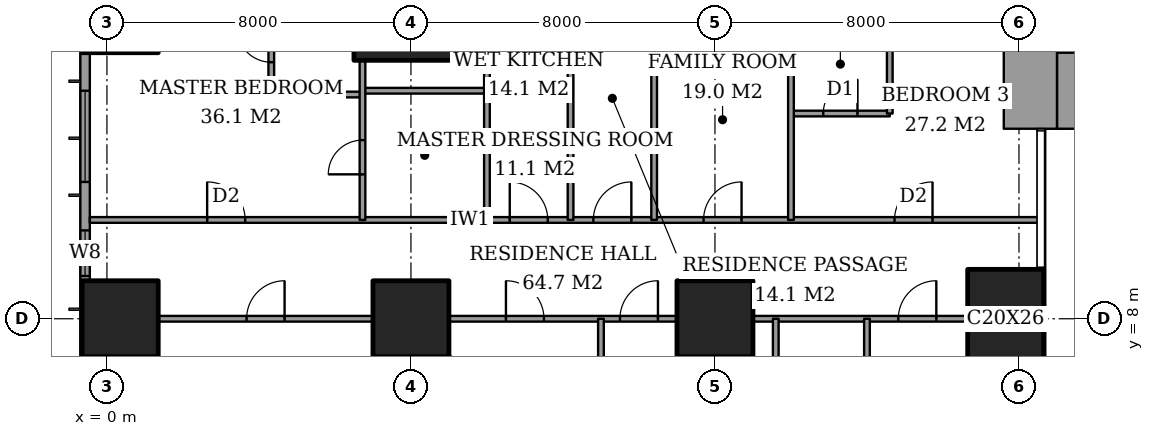
"""IFC4 building model, lengths in metres.
Left out: names, types, materials, properties, quantities, classifications, styles, units other than length and angle.
Written with IfcOpenShell. Run it as: python <this file> out.ifc"""

import sys

from ifc_helpers import new_model, si_unit, direction, frame, frame_2d, origin, origin_2d, place, context, subcontext, project, spatial, rectangle, extrude, element, fill, save


model = new_model("IFC4")
c1 = context("Model", 3, precision=1e-05, world=origin(), true_north=direction((0.0, 1.0)))
c2 = subcontext(c1, "Body", "Model", "MODEL_VIEW")
j1 = project(units=[si_unit("LENGTHUNIT", "METRE"), si_unit("PLANEANGLEUNIT", "RADIAN")], contexts=[c1])
p1 = place(None, origin())
s1 = spatial("IfcSite", under=j1, at=p1, CompositionType="ELEMENT")
p2 = place(p1, origin())
s2 = spatial("IfcBuilding", under=s1, at=p2, CompositionType="ELEMENT")
p3 = place(p2, frame((0.0, 0.0, 51.2)))
s3 = spatial("IfcBuildingStorey", under=s2, at=p3, CompositionType="ELEMENT", Elevation=51.2)
for number, where, z_axis, x_axis in (
    (1, (0.35, 8.0, 0.0), (0.0, 0.0, 1.0), (1.0, 0.0, 0.0)),
    (2, (8.0, 8.0, 0.0), (0.0, 0.0, 1.0), (1.0, 0.0, 0.0)),
):
    element("IfcColumn", number, at=place(p3, frame(where, z_axis=z_axis, x_axis=x_axis)), inside=s3, PredefinedType="COLUMN", context=c2, shape_type="SweptSolid", body=[
        extrude(rectangle(XDim=2.0, YDim=2.0, at=origin_2d()), origin(), (0.0, 0.0, 1.0), 3.6),
    ])
p4 = place(p3, frame((8.0, 16.0, 0.0), z_axis=(0.0, 0.0, 1.0), x_axis=(1.0, 0.0, 0.0)))
e3 = element("IfcColumn", 3, at=p4, inside=s3, PredefinedType="COLUMN", context=c2, shape_type="SweptSolid", body=[
    extrude(rectangle(XDim=3.0, YDim=2.4, at=origin_2d()), origin(), (0.0, 0.0, 1.0), 3.6),
])
p5 = place(p3, frame((16.0, 8.0, 0.0), z_axis=(0.0, 0.0, 1.0), x_axis=(1.0, 0.0, 0.0)))
e4 = element("IfcColumn", 4, at=p5, inside=s3, PredefinedType="COLUMN", context=c2, shape_type="SweptSolid", body=[
    extrude(rectangle(XDim=2.0, YDim=2.0, at=origin_2d()), origin(), (0.0, 0.0, 1.0), 3.6),
])
p6 = place(p3, frame((16.0, 16.0, 0.0), z_axis=(0.0, 0.0, 1.0), x_axis=(1.0, 0.0, 0.0)))
e5 = element("IfcColumn", 5, at=p6, inside=s3, PredefinedType="COLUMN", context=c2, shape_type="SweptSolid", body=[
    extrude(rectangle(XDim=3.0, YDim=2.4, at=origin_2d()), origin(), (0.0, 0.0, 1.0), 3.6),
])
p7 = place(p3, frame((23.65, 8.0, 0.0), z_axis=(0.0, 0.0, 1.0), x_axis=(1.0, 0.0, 0.0)))
e6 = element("IfcColumn", 6, at=p7, inside=s3, PredefinedType="COLUMN", context=c2, shape_type="SweptSolid", body=[
    extrude(rectangle(XDim=2.0, YDim=2.6, at=origin_2d()), origin(), (0.0, 0.0, 1.0), 3.6),
])
p8 = place(p3, frame((25.0, 14.0, 0.0), z_axis=(0.0, 0.0, 1.0), x_axis=(1.0, 0.0, 0.0)))
e7 = element("IfcWall", 7, at=p8, inside=s3, PredefinedType="SHEAR", context=c2, shape_type="SweptSolid", body=[
    extrude(rectangle(XDim=3.15, YDim=2.0, at=frame_2d((1.575, 0.0))), origin(), (0.0, 0.0, 1.0), 3.6),
])
p9 = place(p3, frame((24.3, 13.0, 0.0), z_axis=(0.0, 0.0, 1.0), x_axis=(0.0, 1.0, 0.0)))
e8 = element("IfcWall", 8, at=p9, inside=s3, PredefinedType="SHEAR", context=c2, shape_type="SweptSolid", body=[
    extrude(rectangle(XDim=10.15, YDim=1.4, at=frame_2d((5.075, 0.0))), origin(), (0.0, 0.0, 1.0), 3.6),
])
p10 = place(p3, frame((-0.575, 44.825, 0.0), z_axis=(0.0, 0.0, 1.0), x_axis=(0.0, -1.0, 0.0)))
e9 = element("IfcWall", 9, at=p10, inside=s3, PredefinedType="SOLIDWALL", context=c2, shape_type="SweptSolid", body=[
    extrude(rectangle(XDim=41.65, YDim=0.25, at=frame_2d((20.825, 0.0))), origin(), (0.0, 0.0, 1.0), 3.6),
])
p11 = place(p10, frame((0.775, 0.0, 0.6)))
e10 = element("IfcOpeningElement", 10, at=p11, cuts=e9, PredefinedType="OPENING", context=c2, shape_type="SweptSolid", body=[
    extrude(rectangle(XDim=2.4, YDim=2.0, at=frame_2d((1.2, 1.0))), frame((0.0, 0.135, 0.0), z_axis=(0.0, -1.0, 0.0), x_axis=(1.0, 0.0, 0.0)), (0.0, 0.0, 1.0), 0.27),
])
p12 = place(p10, frame((6.1, 0.0, 0.6)))
e11 = element("IfcOpeningElement", 11, at=p12, cuts=e9, PredefinedType="OPENING", context=c2, shape_type="SweptSolid", body=[
    extrude(rectangle(XDim=1.2, YDim=2.0, at=frame_2d((0.6, 1.0))), frame((0.0, 0.135, 0.0), z_axis=(0.0, -1.0, 0.0), x_axis=(1.0, 0.0, 0.0)), (0.0, 0.0, 1.0), 0.27),
])
p13 = place(p10, frame((8.425, 0.0, 0.6)))
e12 = element("IfcOpeningElement", 12, at=p13, cuts=e9, PredefinedType="OPENING", context=c2, shape_type="SweptSolid", body=[
    extrude(rectangle(XDim=2.4, YDim=2.0, at=frame_2d((1.2, 1.0))), frame((0.0, 0.135, 0.0), z_axis=(0.0, -1.0, 0.0), x_axis=(1.0, 0.0, 0.0)), (0.0, 0.0, 1.0), 0.27),
])
p14 = place(p10, frame((15.625, 0.0, 0.6)))
e13 = element("IfcOpeningElement", 13, at=p14, cuts=e9, PredefinedType="OPENING", context=c2, shape_type="SweptSolid", body=[
    extrude(rectangle(XDim=2.4, YDim=2.0, at=frame_2d((1.2, 1.0))), frame((0.0, 0.135, 0.0), z_axis=(0.0, -1.0, 0.0), x_axis=(1.0, 0.0, 0.0)), (0.0, 0.0, 1.0), 0.27),
])
p15 = place(p10, frame((23.625, 0.0, 0.6)))
e14 = element("IfcOpeningElement", 14, at=p15, cuts=e9, PredefinedType="OPENING", context=c2, shape_type="SweptSolid", body=[
    extrude(rectangle(XDim=2.4, YDim=2.0, at=frame_2d((1.2, 1.0))), frame((0.0, 0.135, 0.0), z_axis=(0.0, -1.0, 0.0), x_axis=(1.0, 0.0, 0.0)), (0.0, 0.0, 1.0), 0.27),
])
p16 = place(p10, frame((30.825, 0.0, 0.6)))
e15 = element("IfcOpeningElement", 15, at=p16, cuts=e9, PredefinedType="OPENING", context=c2, shape_type="SweptSolid", body=[
    extrude(rectangle(XDim=2.4, YDim=2.0, at=frame_2d((1.2, 1.0))), frame((0.0, 0.135, 0.0), z_axis=(0.0, -1.0, 0.0), x_axis=(1.0, 0.0, 0.0)), (0.0, 0.0, 1.0), 0.27),
])
p17 = place(p10, frame((34.5, 0.0, 0.6)))
e16 = element("IfcOpeningElement", 16, at=p17, cuts=e9, PredefinedType="OPENING", context=c2, shape_type="SweptSolid", body=[
    extrude(rectangle(XDim=1.2, YDim=2.0, at=frame_2d((0.6, 1.0))), frame((0.0, 0.135, 0.0), z_axis=(0.0, -1.0, 0.0), x_axis=(1.0, 0.0, 0.0)), (0.0, 0.0, 1.0), 0.27),
])
p18 = place(p10, frame((38.475, 0.0, 0.6)))
e17 = element("IfcOpeningElement", 17, at=p18, cuts=e9, PredefinedType="OPENING", context=c2, shape_type="SweptSolid", body=[
    extrude(rectangle(XDim=2.4, YDim=2.0, at=frame_2d((1.2, 1.0))), frame((0.0, 0.135, 0.0), z_axis=(0.0, -1.0, 0.0), x_axis=(1.0, 0.0, 0.0)), (0.0, 0.0, 1.0), 0.27),
])
p19 = place(p3, frame((1.35, 8.0, 0.0), z_axis=(0.0, 0.0, 1.0), x_axis=(1.0, 0.0, 0.0)))
e18 = element("IfcWall", 18, at=p19, inside=s3, PredefinedType="PARTITIONING", context=c2, shape_type="SweptSolid", body=[
    extrude(rectangle(XDim=5.65, YDim=0.15, at=frame_2d((2.825, 0.0))), origin(), (0.0, 0.0, 1.0), 3.35),
])
p20 = place(p19, frame((2.325, 0.0, 0.0)))
e19 = element("IfcOpeningElement", 19, at=p20, cuts=e18, PredefinedType="OPENING", context=c2, shape_type="SweptSolid", body=[
    extrude(rectangle(XDim=1.0, YDim=2.1, at=frame_2d((0.5, 1.05))), frame((0.0, 0.085, 0.0), z_axis=(0.0, -1.0, 0.0), x_axis=(1.0, 0.0, 0.0)), (0.0, 0.0, 1.0), 0.17),
])
p21 = place(p3, frame((9.0, 8.0, 0.0), z_axis=(0.0, 0.0, 1.0), x_axis=(1.0, 0.0, 0.0)))
e20 = element("IfcWall", 20, at=p21, inside=s3, PredefinedType="PARTITIONING", context=c2, shape_type="SweptSolid", body=[
    extrude(rectangle(XDim=6.0, YDim=0.15, at=frame_2d((3.0, 0.0))), origin(), (0.0, 0.0, 1.0), 3.35),
])
p22 = place(p21, frame((1.5, 0.0, 0.0)))
e21 = element("IfcOpeningElement", 21, at=p22, cuts=e20, PredefinedType="OPENING", context=c2, shape_type="SweptSolid", body=[
    extrude(rectangle(XDim=1.0, YDim=2.1, at=frame_2d((0.5, 1.05))), frame((0.0, 0.085, 0.0), z_axis=(0.0, -1.0, 0.0), x_axis=(1.0, 0.0, 0.0)), (0.0, 0.0, 1.0), 0.17),
])
p23 = place(p21, frame((4.5, 0.0, 0.0)))
e22 = element("IfcOpeningElement", 22, at=p23, cuts=e20, PredefinedType="OPENING", context=c2, shape_type="SweptSolid", body=[
    extrude(rectangle(XDim=1.0, YDim=2.1, at=frame_2d((0.5, 1.05))), frame((0.0, 0.085, 0.0), z_axis=(0.0, -1.0, 0.0), x_axis=(1.0, 0.0, 0.0)), (0.0, 0.0, 1.0), 0.17),
])
p24 = place(p3, frame((17.0, 8.0, 0.0), z_axis=(0.0, 0.0, 1.0), x_axis=(1.0, 0.0, 0.0)))
e23 = element("IfcWall", 23, at=p24, inside=s3, PredefinedType="PARTITIONING", context=c2, shape_type="SweptSolid", body=[
    extrude(rectangle(XDim=5.65, YDim=0.15, at=frame_2d((2.825, 0.0))), origin(), (0.0, 0.0, 1.0), 3.35),
])
p25 = place(p24, frame((3.825, 0.0, 0.0)))
e24 = element("IfcOpeningElement", 24, at=p25, cuts=e23, PredefinedType="OPENING", context=c2, shape_type="SweptSolid", body=[
    extrude(rectangle(XDim=1.0, YDim=2.1, at=frame_2d((0.5, 1.05))), frame((0.0, 0.085, 0.0), z_axis=(0.0, -1.0, 0.0), x_axis=(1.0, 0.0, 0.0)), (0.0, 0.0, 1.0), 0.17),
])
p26 = place(p3, frame((-0.45, 10.6, 0.0), z_axis=(0.0, 0.0, 1.0), x_axis=(1.0, 0.0, 0.0)))
e25 = element("IfcWall", 25, at=p26, inside=s3, PredefinedType="PARTITIONING", context=c2, shape_type="SweptSolid", body=[
    extrude(rectangle(XDim=25.011, YDim=0.15, at=frame_2d((12.505, 0.0))), origin(), (0.0, 0.0, 1.0), 3.35),
])
p27 = place(p26, frame((13.25, 0.0, 0.0)))
e26 = element("IfcOpeningElement", 26, at=p27, cuts=e25, PredefinedType="OPENING", context=c2, shape_type="SweptSolid", body=[
    extrude(rectangle(XDim=1.0, YDim=2.1, at=frame_2d((0.5, 1.05))), frame((0.0, 0.085, 0.0), z_axis=(0.0, -1.0, 0.0), x_axis=(1.0, 0.0, 0.0)), (0.0, 0.0, 1.0), 0.17),
])
p28 = place(p26, frame((3.087, 0.0, 0.0)))
e27 = element("IfcOpeningElement", 27, at=p28, cuts=e25, PredefinedType="OPENING", context=c2, shape_type="SweptSolid", body=[
    extrude(rectangle(XDim=1.0, YDim=2.1, at=frame_2d((0.5, 1.05))), frame((0.0, 0.085, 0.0), z_axis=(0.0, -1.0, 0.0), x_axis=(1.0, 0.0, 0.0)), (0.0, 0.0, 1.0), 0.17),
])
p29 = place(p26, frame((11.05, 0.0, 0.0)))
e28 = element("IfcOpeningElement", 28, at=p29, cuts=e25, PredefinedType="OPENING", context=c2, shape_type="SweptSolid", body=[
    extrude(rectangle(XDim=1.0, YDim=2.1, at=frame_2d((0.5, 1.05))), frame((0.0, 0.085, 0.0), z_axis=(0.0, -1.0, 0.0), x_axis=(1.0, 0.0, 0.0)), (0.0, 0.0, 1.0), 0.17),
])
p30 = place(p26, frame((16.15, 0.0, 0.0)))
e29 = element("IfcOpeningElement", 29, at=p30, cuts=e25, PredefinedType="OPENING", context=c2, shape_type="SweptSolid", body=[
    extrude(rectangle(XDim=1.0, YDim=2.1, at=frame_2d((0.5, 1.05))), frame((0.0, 0.085, 0.0), z_axis=(0.0, -1.0, 0.0), x_axis=(1.0, 0.0, 0.0)), (0.0, 0.0, 1.0), 0.17),
])
p31 = place(p26, frame((21.175, 0.0, 0.0)))
e30 = element("IfcOpeningElement", 30, at=p31, cuts=e25, PredefinedType="OPENING", context=c2, shape_type="SweptSolid", body=[
    extrude(rectangle(XDim=1.0, YDim=2.1, at=frame_2d((0.5, 1.05))), frame((0.0, 0.085, 0.0), z_axis=(0.0, -1.0, 0.0), x_axis=(1.0, 0.0, 0.0)), (0.0, 0.0, 1.0), 0.17),
])
p32 = place(p3, frame((18.0, 13.4, 0.0), z_axis=(0.0, 0.0, 1.0), x_axis=(1.0, 0.0, 0.0)))
e31 = element("IfcWall", 31, at=p32, inside=s3, PredefinedType="PARTITIONING", context=c2, shape_type="SweptSolid", body=[
    extrude(rectangle(XDim=2.6, YDim=0.15, at=frame_2d((1.3, 0.0))), origin(), (0.0, 0.0, 1.0), 3.35),
])
p33 = place(p32, frame((0.85, 0.0, 0.0)))
e32 = element("IfcOpeningElement", 32, at=p33, cuts=e31, PredefinedType="OPENING", context=c2, shape_type="SweptSolid", body=[
    extrude(rectangle(XDim=0.9, YDim=2.1, at=frame_2d((0.45, 1.05))), frame((0.0, 0.085, 0.0), z_axis=(0.0, -1.0, 0.0), x_axis=(1.0, 0.0, 0.0)), (0.0, 0.0, 1.0), 0.17),
])
p34 = place(p3, frame((4.325, 13.9, 0.0), z_axis=(0.0, 0.0, 1.0), x_axis=(1.0, 0.0, 0.0)))
e33 = element("IfcWall", 33, at=p34, inside=s3, PredefinedType="PARTITIONING", context=c2, shape_type="SweptSolid", body=[
    extrude(rectangle(XDim=2.4, YDim=0.15, at=frame_2d((1.2, 0.0))), origin(), (0.0, 0.0, 1.0), 3.35),
])
p35 = place(p3, frame((6.725, 14.0, 0.0), z_axis=(0.0, 0.0, 1.0), x_axis=(1.0, 0.0, 0.0)))
e34 = element("IfcWall", 34, at=p35, inside=s3, PredefinedType="PARTITIONING", context=c2, shape_type="SweptSolid", body=[
    extrude(rectangle(XDim=3.275, YDim=0.15, at=frame_2d((1.637, 0.0))), origin(), (0.0, 0.0, 1.0), 3.35),
])
p36 = place(p3, frame((4.325, 13.9, 0.0), z_axis=(0.0, 0.0, 1.0), x_axis=(0.0, 1.0, 0.0)))
e35 = element("IfcWall", 35, at=p36, inside=s3, PredefinedType="PARTITIONING", context=c2, shape_type="SweptSolid", body=[
    extrude(rectangle(XDim=2.6, YDim=0.15, at=frame_2d((1.3, 0.0))), origin(), (0.0, 0.0, 1.0), 3.35),
])
p37 = place(p36, frame((0.85, 0.0, 0.0)))
e36 = element("IfcOpeningElement", 36, at=p37, cuts=e35, PredefinedType="OPENING", context=c2, shape_type="SweptSolid", body=[
    extrude(rectangle(XDim=0.9, YDim=2.1, at=frame_2d((0.45, 1.05))), frame((0.0, 0.085, 0.0), z_axis=(0.0, -1.0, 0.0), x_axis=(1.0, 0.0, 0.0)), (0.0, 0.0, 1.0), 0.17),
])
p38 = place(p3, frame((6.725, 10.6, 0.0), z_axis=(0.0, 0.0, 1.0), x_axis=(0.0, 1.0, 0.0)))
e37 = element("IfcWall", 37, at=p38, inside=s3, PredefinedType="PARTITIONING", context=c2, shape_type="SweptSolid", body=[
    extrude(rectangle(XDim=4.2, YDim=0.15, at=frame_2d((2.1, 0.0))), origin(), (0.0, 0.0, 1.0), 3.35),
])
p39 = place(p38, frame((1.2, 0.0, 0.0)))
e38 = element("IfcOpeningElement", 38, at=p39, cuts=e37, PredefinedType="OPENING", context=c2, shape_type="SweptSolid", body=[
    extrude(rectangle(XDim=0.9, YDim=2.1, at=frame_2d((0.45, 1.05))), frame((0.0, 0.085, 0.0), z_axis=(0.0, -1.0, 0.0), x_axis=(1.0, 0.0, 0.0)), (0.0, 0.0, 1.0), 0.17),
])
p40 = place(p3, frame((10.0, 10.6, 0.0), z_axis=(0.0, 0.0, 1.0), x_axis=(0.0, 1.0, 0.0)))
e39 = element("IfcWall", 39, at=p40, inside=s3, PredefinedType="PARTITIONING", context=c2, shape_type="SweptSolid", body=[
    extrude(rectangle(XDim=11.0, YDim=0.15, at=frame_2d((5.5, 0.0))), origin(), (0.0, 0.0, 1.0), 3.35),
])
p41 = place(p40, frame((8.2, 0.0, 0.0)))
e40 = element("IfcOpeningElement", 40, at=p41, cuts=e39, PredefinedType="OPENING", context=c2, shape_type="SweptSolid", body=[
    extrude(rectangle(XDim=1.0, YDim=2.1, at=frame_2d((0.5, 1.05))), frame((0.0, 0.085, 0.0), z_axis=(0.0, -1.0, 0.0), x_axis=(1.0, 0.0, 0.0)), (0.0, 0.0, 1.0), 0.17),
])
p42 = place(p3, frame((12.2, 10.6, 0.0), z_axis=(0.0, 0.0, 1.0), x_axis=(0.0, 1.0, 0.0)))
e41 = element("IfcWall", 41, at=p42, inside=s3, PredefinedType="PARTITIONING", context=c2, shape_type="SweptSolid", body=[
    extrude(rectangle(XDim=6.4, YDim=0.15, at=frame_2d((3.2, 0.0))), origin(), (0.0, 0.0, 1.0), 3.35),
])
p43 = place(p3, frame((13.0, -0.45, 0.0), z_axis=(0.0, 0.0, 1.0), x_axis=(0.0, 1.0, 0.0)))
e42 = element("IfcWall", 42, at=p43, inside=s3, PredefinedType="PARTITIONING", context=c2, shape_type="SweptSolid", body=[
    extrude(rectangle(XDim=8.45, YDim=0.15, at=frame_2d((4.225, 0.0))), origin(), (0.0, 0.0, 1.0), 3.35),
])
p44 = place(p3, frame((14.4, 10.6, 0.0), z_axis=(0.0, 0.0, 1.0), x_axis=(0.0, 1.0, 0.0)))
e43 = element("IfcWall", 43, at=p44, inside=s3, PredefinedType="PARTITIONING", context=c2, shape_type="SweptSolid", body=[
    extrude(rectangle(XDim=6.4, YDim=0.15, at=frame_2d((3.2, 0.0))), origin(), (0.0, 0.0, 1.0), 3.35),
])
p45 = place(p3, frame((17.6, -0.45, 0.0), z_axis=(0.0, 0.0, 1.0), x_axis=(0.0, 1.0, 0.0)))
e44 = element("IfcWall", 44, at=p45, inside=s3, PredefinedType="PARTITIONING", context=c2, shape_type="SweptSolid", body=[
    extrude(rectangle(XDim=8.45, YDim=0.15, at=frame_2d((4.225, 0.0))), origin(), (0.0, 0.0, 1.0), 3.35),
])
p46 = place(p3, frame((18.0, 10.6, 0.0), z_axis=(0.0, 0.0, 1.0), x_axis=(0.0, 1.0, 0.0)))
e45 = element("IfcWall", 45, at=p46, inside=s3, PredefinedType="PARTITIONING", context=c2, shape_type="SweptSolid", body=[
    extrude(rectangle(XDim=6.4, YDim=0.15, at=frame_2d((3.2, 0.0))), origin(), (0.0, 0.0, 1.0), 3.35),
])
p47 = place(p3, frame((20.0, -0.45, 0.0), z_axis=(0.0, 0.0, 1.0), x_axis=(0.0, 1.0, 0.0)))
e46 = element("IfcWall", 46, at=p47, inside=s3, PredefinedType="PARTITIONING", context=c2, shape_type="SweptSolid", body=[
    extrude(rectangle(XDim=8.45, YDim=0.15, at=frame_2d((4.225, 0.0))), origin(), (0.0, 0.0, 1.0), 3.35),
])
p48 = place(p47, frame((3.775, 0.0, 0.0)))
e47 = element("IfcOpeningElement", 47, at=p48, cuts=e46, PredefinedType="OPENING", context=c2, shape_type="SweptSolid", body=[
    extrude(rectangle(XDim=0.9, YDim=2.1, at=frame_2d((0.45, 1.05))), frame((0.0, 0.085, 0.0), z_axis=(0.0, -1.0, 0.0), x_axis=(1.0, 0.0, 0.0)), (0.0, 0.0, 1.0), 0.17),
])
p49 = place(p3, frame((20.6, 13.4, 0.0), z_axis=(0.0, 0.0, 1.0), x_axis=(0.0, 1.0, 0.0)))
e48 = element("IfcWall", 48, at=p49, inside=s3, PredefinedType="PARTITIONING", context=c2, shape_type="SweptSolid", body=[
    extrude(rectangle(XDim=2.6, YDim=0.15, at=frame_2d((1.3, 0.0))), origin(), (0.0, 0.0, 1.0), 3.35),
])
p50 = place(p16, origin())
e49 = element("IfcWindow", 49, at=p50, inside=s3, PartitioningType="SINGLE_PANEL", PredefinedType="WINDOW", context=c2, shape_type="SweptSolid", body=[
    extrude(rectangle(XDim=2.4, YDim=2.0, at=frame_2d((1.2, 1.0))), frame((0.0, 0.03, 0.0), z_axis=(0.0, -1.0, 0.0), x_axis=(1.0, 0.0, 0.0)), (0.0, 0.0, 1.0), 0.06),
])
fill(e15, e49)
p51 = place(p17, origin())
e50 = element("IfcWindow", 50, at=p51, inside=s3, PartitioningType="SINGLE_PANEL", PredefinedType="WINDOW", context=c2, shape_type="SweptSolid", body=[
    extrude(rectangle(XDim=1.2, YDim=2.0, at=frame_2d((0.6, 1.0))), frame((0.0, 0.03, 0.0), z_axis=(0.0, -1.0, 0.0), x_axis=(1.0, 0.0, 0.0)), (0.0, 0.0, 1.0), 0.06),
])
fill(e16, e50)
p52 = place(p20, origin())
e51 = element("IfcDoor", 51, at=p52, inside=s3, OperationType="SINGLE_SWING_LEFT", PredefinedType="DOOR", context=c2, shape_type="SweptSolid", body=[
    extrude(rectangle(XDim=1.0, YDim=2.1, at=frame_2d((0.5, 1.05))), frame((0.0, 0.025, 0.0), z_axis=(0.0, -1.0, 0.0), x_axis=(1.0, 0.0, 0.0)), (0.0, 0.0, 1.0), 0.05),
])
fill(e19, e51)
p53 = place(p22, origin())
e52 = element("IfcDoor", 52, at=p53, inside=s3, OperationType="SINGLE_SWING_RIGHT", PredefinedType="DOOR", context=c2, shape_type="SweptSolid", body=[
    extrude(rectangle(XDim=1.0, YDim=2.1, at=frame_2d((0.5, 1.05))), frame((0.0, 0.025, 0.0), z_axis=(0.0, -1.0, 0.0), x_axis=(1.0, 0.0, 0.0)), (0.0, 0.0, 1.0), 0.05),
])
fill(e21, e52)
p54 = place(p23, origin())
e53 = element("IfcDoor", 53, at=p54, inside=s3, OperationType="SINGLE_SWING_LEFT", PredefinedType="DOOR", context=c2, shape_type="SweptSolid", body=[
    extrude(rectangle(XDim=1.0, YDim=2.1, at=frame_2d((0.5, 1.05))), frame((0.0, 0.025, 0.0), z_axis=(0.0, -1.0, 0.0), x_axis=(1.0, 0.0, 0.0)), (0.0, 0.0, 1.0), 0.05),
])
fill(e22, e53)
p55 = place(p25, origin())
e54 = element("IfcDoor", 54, at=p55, inside=s3, OperationType="SINGLE_SWING_LEFT", PredefinedType="DOOR", context=c2, shape_type="SweptSolid", body=[
    extrude(rectangle(XDim=1.0, YDim=2.1, at=frame_2d((0.5, 1.05))), frame((0.0, 0.025, 0.0), z_axis=(0.0, -1.0, 0.0), x_axis=(1.0, 0.0, 0.0)), (0.0, 0.0, 1.0), 0.05),
])
fill(e24, e54)
p56 = place(p27, origin())
e55 = element("IfcDoor", 55, at=p56, inside=s3, OperationType="SINGLE_SWING_LEFT", PredefinedType="DOOR", context=c2, shape_type="SweptSolid", body=[
    extrude(rectangle(XDim=1.0, YDim=2.1, at=frame_2d((0.5, 1.05))), frame((0.0, 0.025, 0.0), z_axis=(0.0, -1.0, 0.0), x_axis=(1.0, 0.0, 0.0)), (0.0, 0.0, 1.0), 0.05),
])
fill(e26, e55)
p57 = place(p37, origin())
e56 = element("IfcDoor", 56, at=p57, inside=s3, OperationType="SINGLE_SWING_LEFT", PredefinedType="DOOR", context=c2, shape_type="SweptSolid", body=[
    extrude(rectangle(XDim=0.9, YDim=2.1, at=frame_2d((0.45, 1.05))), frame((0.0, 0.025, 0.0), z_axis=(0.0, -1.0, 0.0), x_axis=(1.0, 0.0, 0.0)), (0.0, 0.0, 1.0), 0.05),
])
fill(e36, e56)
p58 = place(p28, origin())
e57 = element("IfcDoor", 57, at=p58, inside=s3, OperationType="SINGLE_SWING_RIGHT", PredefinedType="DOOR", context=c2, shape_type="SweptSolid", body=[
    extrude(rectangle(XDim=1.0, YDim=2.1, at=frame_2d((0.5, 1.05))), frame((0.0, 0.025, 0.0), z_axis=(0.0, -1.0, 0.0), x_axis=(1.0, 0.0, 0.0)), (0.0, 0.0, 1.0), 0.05),
])
fill(e27, e57)
p59 = place(p39, origin())
e58 = element("IfcDoor", 58, at=p59, inside=s3, OperationType="SINGLE_SWING_RIGHT", PredefinedType="DOOR", context=c2, shape_type="SweptSolid", body=[
    extrude(rectangle(XDim=0.9, YDim=2.1, at=frame_2d((0.45, 1.05))), frame((0.0, 0.025, 0.0), z_axis=(0.0, -1.0, 0.0), x_axis=(1.0, 0.0, 0.0)), (0.0, 0.0, 1.0), 0.05),
])
fill(e38, e58)
p60 = place(p29, origin())
e59 = element("IfcDoor", 59, at=p60, inside=s3, OperationType="SINGLE_SWING_RIGHT", PredefinedType="DOOR", context=c2, shape_type="SweptSolid", body=[
    extrude(rectangle(XDim=1.0, YDim=2.1, at=frame_2d((0.5, 1.05))), frame((0.0, 0.025, 0.0), z_axis=(0.0, -1.0, 0.0), x_axis=(1.0, 0.0, 0.0)), (0.0, 0.0, 1.0), 0.05),
])
fill(e28, e59)
p61 = place(p30, origin())
e60 = element("IfcDoor", 60, at=p61, inside=s3, OperationType="SINGLE_SWING_LEFT", PredefinedType="DOOR", context=c2, shape_type="SweptSolid", body=[
    extrude(rectangle(XDim=1.0, YDim=2.1, at=frame_2d((0.5, 1.05))), frame((0.0, 0.025, 0.0), z_axis=(0.0, -1.0, 0.0), x_axis=(1.0, 0.0, 0.0)), (0.0, 0.0, 1.0), 0.05),
])
fill(e29, e60)
p62 = place(p33, origin())
e61 = element("IfcDoor", 61, at=p62, inside=s3, OperationType="SINGLE_SWING_LEFT", PredefinedType="DOOR", context=c2, shape_type="SweptSolid", body=[
    extrude(rectangle(XDim=0.9, YDim=2.1, at=frame_2d((0.45, 1.05))), frame((0.0, 0.025, 0.0), z_axis=(0.0, -1.0, 0.0), x_axis=(1.0, 0.0, 0.0)), (0.0, 0.0, 1.0), 0.05),
])
fill(e32, e61)
p63 = place(p31, origin())
e62 = element("IfcDoor", 62, at=p63, inside=s3, OperationType="SINGLE_SWING_LEFT", PredefinedType="DOOR", context=c2, shape_type="SweptSolid", body=[
    extrude(rectangle(XDim=1.0, YDim=2.1, at=frame_2d((0.5, 1.05))), frame((0.0, 0.025, 0.0), z_axis=(0.0, -1.0, 0.0), x_axis=(1.0, 0.0, 0.0)), (0.0, 0.0, 1.0), 0.05),
])
fill(e30, e62)
save(model, sys.argv[1])
